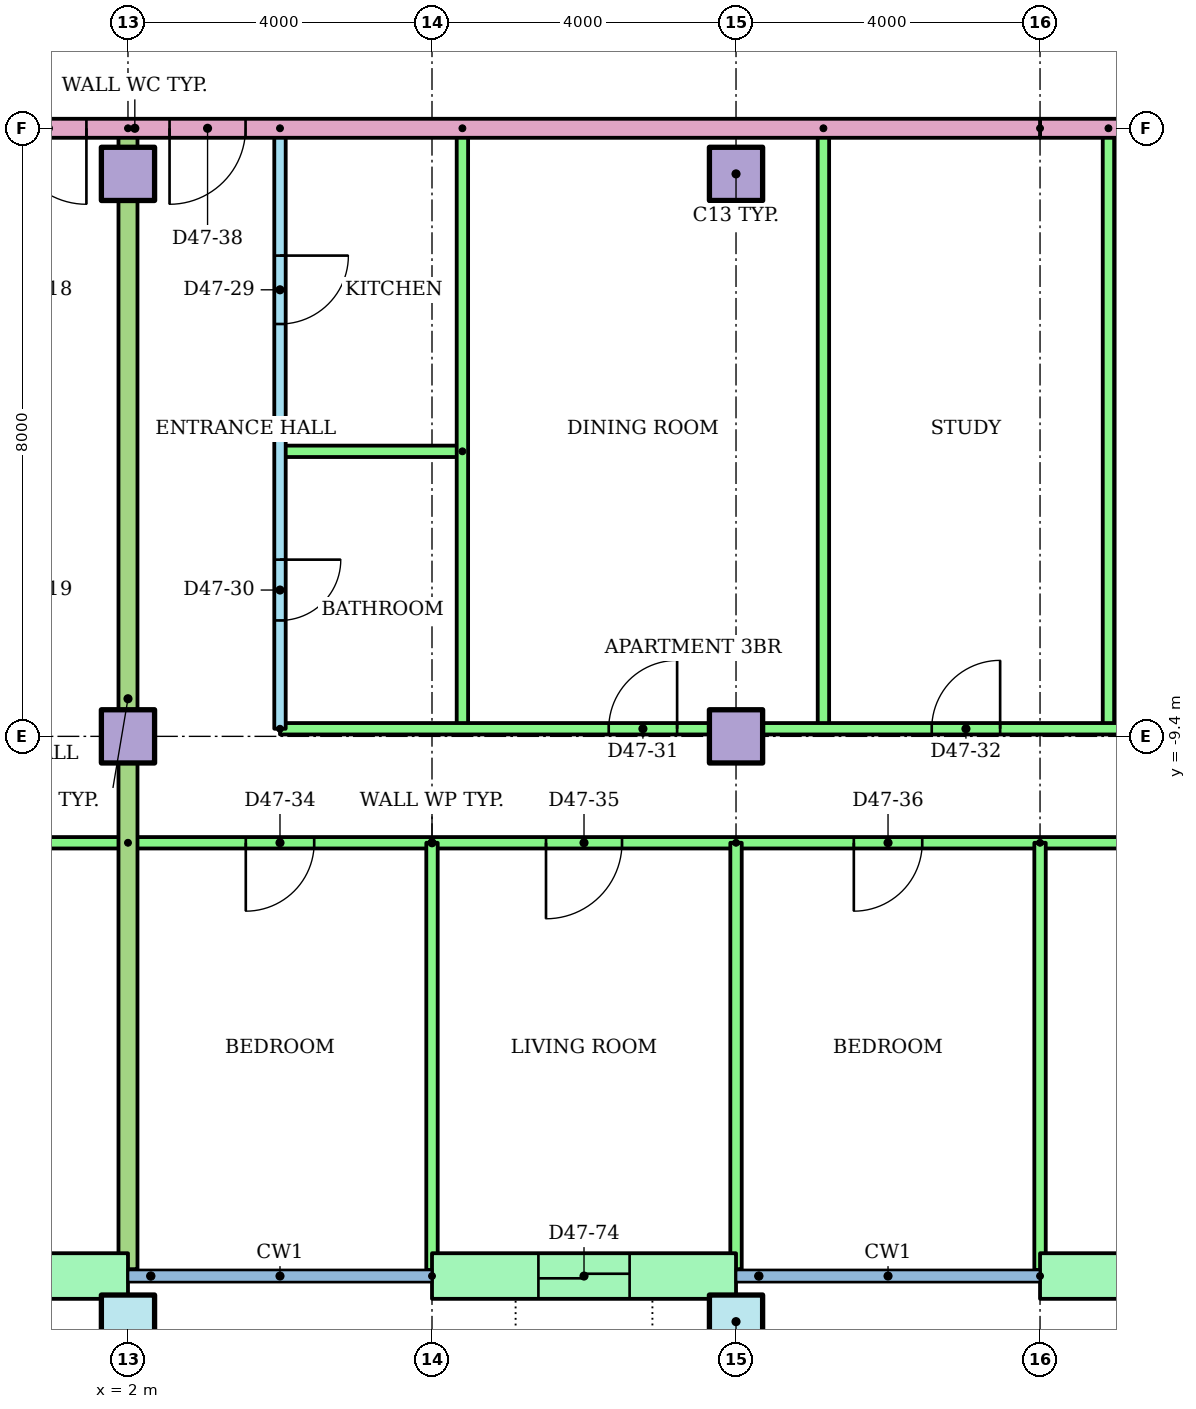
"""IFC4 building model, lengths in metres.
Left out: names, types, materials, properties, quantities, classifications, styles, units other than length and angle.
Written with IfcOpenShell. Run it as: python <this file> out.ifc"""

import sys

from ifc_helpers import new_model, si_unit, direction, frame, frame_2d, origin, origin_2d, place, context, subcontext, project, spatial, rectangle, hollow_rectangle, extrude, element, fill, save


model = new_model("IFC4")
c1 = context("Model", 3, precision=1e-05, world=origin(), true_north=direction((0.0, 1.0)))
c2 = subcontext(c1, "Body", "Model", "MODEL_VIEW")
j1 = project(units=[si_unit("LENGTHUNIT", "METRE"), si_unit("PLANEANGLEUNIT", "RADIAN")], contexts=[c1])
p1 = place(None, origin())
s1 = spatial("IfcSite", under=j1, at=p1, CompositionType="ELEMENT")
p2 = place(p1, origin())
s2 = spatial("IfcBuilding", under=s1, at=p2, CompositionType="ELEMENT")
p3 = place(p2, frame((0.0, 0.0, 181.3)))
s3 = spatial("IfcBuildingStorey", under=s2, at=p3, CompositionType="ELEMENT", Elevation=181.3)
for number, where in (
    (1, (2.0, -17.1, 0.0)),
    (2, (10.0, -17.1, 0.0)),
):
    element("IfcColumn", number, at=place(p3, frame(where)), inside=s3, PredefinedType="COLUMN", context=c2, shape_type="SweptSolid", body=[
        extrude(hollow_rectangle(XDim=0.7, YDim=0.7, WallThickness=0.036, at=origin_2d()), origin(), (0.0, 0.0, 1.0), 3.2),
    ])
for number, where in (
    (3, (2.0, -9.4, 0.0)),
    (4, (10.0, -9.4, 0.0)),
    (5, (2.0, -2.0, 0.0)),
    (6, (10.0, -2.0, 0.0)),
):
    element("IfcColumn", number, at=place(p3, frame(where)), inside=s3, PredefinedType="COLUMN", context=c2, shape_type="SweptSolid", body=[
        extrude(rectangle(XDim=0.7, YDim=0.7, at=origin_2d()), origin(), (0.0, 0.0, 1.0), 3.2),
    ])
p4 = place(p3, frame((-2.0, -16.5, 0.0)))
e7 = element("IfcWall", 7, at=p4, inside=s3, PredefinedType="STANDARD", context=c2, shape_type="SweptSolid", body=[
    extrude(rectangle(XDim=4.0, YDim=0.6, at=frame_2d((2.0, 0.0))), origin(), (0.0, 0.0, 1.0), 2.92),
])
p5 = place(p4, frame((1.4, 0.0, 0.0)))
e8 = element("IfcOpeningElement", 8, at=p5, cuts=e7, PredefinedType="OPENING", context=c2, shape_type="SweptSolid", body=[
    extrude(rectangle(XDim=1.2, YDim=2.1, at=frame_2d((0.6, 1.05))), frame((0.0, 0.31, 0.0), z_axis=(0.0, -1.0, 0.0), x_axis=(1.0, 0.0, 0.0)), (0.0, 0.0, 1.0), 0.62),
])
p6 = place(p3, frame((6.0, -16.5, 0.0)))
e9 = element("IfcWall", 9, at=p6, inside=s3, PredefinedType="STANDARD", context=c2, shape_type="SweptSolid", body=[
    extrude(rectangle(XDim=4.0, YDim=0.6, at=frame_2d((2.0, 0.0))), origin(), (0.0, 0.0, 1.0), 2.92),
])
p7 = place(p6, frame((1.4, 0.0, 0.0)))
e10 = element("IfcOpeningElement", 10, at=p7, cuts=e9, PredefinedType="OPENING", context=c2, shape_type="SweptSolid", body=[
    extrude(rectangle(XDim=1.2, YDim=2.1, at=frame_2d((0.6, 1.05))), frame((0.0, 0.31, 0.0), z_axis=(0.0, -1.0, 0.0), x_axis=(1.0, 0.0, 0.0)), (0.0, 0.0, 1.0), 0.62),
])
p8 = place(p3, frame((14.0, -16.5, 0.0)))
e11 = element("IfcWall", 11, at=p8, inside=s3, PredefinedType="STANDARD", context=c2, shape_type="SweptSolid", body=[
    extrude(rectangle(XDim=4.0, YDim=0.6, at=frame_2d((2.0, 0.0))), origin(), (0.0, 0.0, 1.0), 2.92),
])
p9 = place(p8, frame((1.4, 0.0, 0.0)))
e12 = element("IfcOpeningElement", 12, at=p9, cuts=e11, PredefinedType="OPENING", context=c2, shape_type="SweptSolid", body=[
    extrude(rectangle(XDim=1.2, YDim=2.1, at=frame_2d((0.6, 1.05))), frame((0.0, 0.31, 0.0), z_axis=(0.0, -1.0, 0.0), x_axis=(1.0, 0.0, 0.0)), (0.0, 0.0, 1.0), 0.62),
])
p10 = place(p3, frame((2.0, -10.8, 0.0), z_axis=(0.0, 0.0, 1.0), x_axis=(-1.0, 0.0, 0.0)))
e13 = element("IfcWall", 13, at=p10, inside=s3, PredefinedType="PARTITIONING", context=c2, shape_type="SweptSolid", body=[
    extrude(rectangle(XDim=26.82, YDim=0.15, at=frame_2d((13.41, 0.0))), origin(), (0.0, 0.0, 1.0), 2.4),
])
p11 = place(p10, frame((24.547, 0.0, 0.0)))
e14 = element("IfcOpeningElement", 14, at=p11, cuts=e13, PredefinedType="OPENING", context=c2, shape_type="SweptSolid", body=[
    extrude(rectangle(XDim=0.9, YDim=2.1, at=frame_2d((0.45, 1.05))), frame((0.0, 0.085, 0.0), z_axis=(0.0, -1.0, 0.0), x_axis=(1.0, 0.0, 0.0)), (0.0, 0.0, 1.0), 0.17),
])
p12 = place(p10, frame((18.6, 0.0, 0.0)))
e15 = element("IfcOpeningElement", 15, at=p12, cuts=e13, PredefinedType="OPENING", context=c2, shape_type="SweptSolid", body=[
    extrude(rectangle(XDim=0.9, YDim=2.1, at=frame_2d((0.45, 1.05))), frame((0.0, 0.085, 0.0), z_axis=(0.0, -1.0, 0.0), x_axis=(1.0, 0.0, 0.0)), (0.0, 0.0, 1.0), 0.17),
])
p13 = place(p10, frame((11.5, 0.0, 0.0)))
e16 = element("IfcOpeningElement", 16, at=p13, cuts=e13, PredefinedType="OPENING", context=c2, shape_type="SweptSolid", body=[
    extrude(rectangle(XDim=1.0, YDim=2.1, at=frame_2d((0.5, 1.05))), frame((0.0, 0.085, 0.0), z_axis=(0.0, -1.0, 0.0), x_axis=(1.0, 0.0, 0.0)), (0.0, 0.0, 1.0), 0.17),
])
p14 = place(p10, frame((5.55, 0.0, 0.0)))
e17 = element("IfcOpeningElement", 17, at=p14, cuts=e13, PredefinedType="OPENING", context=c2, shape_type="SweptSolid", body=[
    extrude(rectangle(XDim=0.9, YDim=2.1, at=frame_2d((0.45, 1.05))), frame((0.0, 0.085, 0.0), z_axis=(0.0, -1.0, 0.0), x_axis=(1.0, 0.0, 0.0)), (0.0, 0.0, 1.0), 0.17),
])
p15 = place(p10, frame((1.55, 0.0, 0.0)))
e18 = element("IfcOpeningElement", 18, at=p15, cuts=e13, PredefinedType="OPENING", context=c2, shape_type="SweptSolid", body=[
    extrude(rectangle(XDim=0.9, YDim=2.1, at=frame_2d((0.45, 1.05))), frame((0.0, 0.085, 0.0), z_axis=(0.0, -1.0, 0.0), x_axis=(1.0, 0.0, 0.0)), (0.0, 0.0, 1.0), 0.17),
])
p16 = place(p3, frame((4.0, -1.4, 0.0), z_axis=(0.0, 0.0, 1.0), x_axis=(0.0, -1.0, 0.0)))
e19 = element("IfcWall", 19, at=p16, inside=s3, PredefinedType="PARTITIONING", context=c2, shape_type="SweptSolid", body=[
    extrude(rectangle(XDim=7.9, YDim=0.15, at=frame_2d((3.95, 0.0))), origin(), (0.0, 0.0, 1.0), 2.4),
])
p17 = place(p16, frame((1.675, 0.0, 0.0)))
e20 = element("IfcOpeningElement", 20, at=p17, cuts=e19, PredefinedType="OPENING", context=c2, shape_type="SweptSolid", body=[
    extrude(rectangle(XDim=0.9, YDim=2.1, at=frame_2d((0.45, 1.05))), frame((0.0, 0.085, 0.0), z_axis=(0.0, -1.0, 0.0), x_axis=(1.0, 0.0, 0.0)), (0.0, 0.0, 1.0), 0.17),
])
p18 = place(p16, frame((5.675, 0.0, 0.0)))
e21 = element("IfcOpeningElement", 21, at=p18, cuts=e19, PredefinedType="OPENING", context=c2, shape_type="SweptSolid", body=[
    extrude(rectangle(XDim=0.8, YDim=2.1, at=frame_2d((0.4, 1.05))), frame((0.0, 0.085, 0.0), z_axis=(0.0, -1.0, 0.0), x_axis=(1.0, 0.0, 0.0)), (0.0, 0.0, 1.0), 0.17),
])
p19 = place(p3, frame((6.4, -5.65, 0.0), z_axis=(0.0, 0.0, 1.0), x_axis=(-1.0, 0.0, 0.0)))
e22 = element("IfcWall", 22, at=p19, inside=s3, PredefinedType="PARTITIONING", context=c2, shape_type="SweptSolid", body=[
    extrude(rectangle(XDim=2.4, YDim=0.15, at=frame_2d((1.2, 0.0))), origin(), (0.0, 0.0, 1.0), 2.4),
])
for number, where, z_axis, x_axis in (
    (23, (6.4, -1.4, 0.0), (0.0, 0.0, 1.0), (0.0, -1.0, 0.0)),
    (24, (11.15, -1.4, 0.0), (0.0, 0.0, 1.0), (0.0, -1.0, 0.0)),
    (25, (14.9, -1.4, 0.0), (0.0, 0.0, 1.0), (0.0, -1.0, 0.0)),
):
    element("IfcWall", number, at=place(p3, frame(where, z_axis=z_axis, x_axis=x_axis)), inside=s3, PredefinedType="PARTITIONING", context=c2, shape_type="SweptSolid", body=[
        extrude(rectangle(XDim=7.9, YDim=0.15, at=frame_2d((3.95, 0.0))), origin(), (0.0, 0.0, 1.0), 2.4),
    ])
p20 = place(p3, frame((4.0, -9.3, 0.0)))
e26 = element("IfcWall", 26, at=p20, inside=s3, PredefinedType="PARTITIONING", context=c2, shape_type="SweptSolid", body=[
    extrude(rectangle(XDim=14.0, YDim=0.15, at=frame_2d((7.0, 0.0))), origin(), (0.0, 0.0, 1.0), 2.4),
])
p21 = place(p20, frame((4.325, 0.0, 0.0)))
e27 = element("IfcOpeningElement", 27, at=p21, cuts=e26, PredefinedType="OPENING", context=c2, shape_type="SweptSolid", body=[
    extrude(rectangle(XDim=0.9, YDim=2.1, at=frame_2d((0.45, 1.05))), frame((0.0, 0.085, 0.0), z_axis=(0.0, -1.0, 0.0), x_axis=(1.0, 0.0, 0.0)), (0.0, 0.0, 1.0), 0.17),
])
p22 = place(p20, frame((8.575, 0.0, 0.0)))
e28 = element("IfcOpeningElement", 28, at=p22, cuts=e26, PredefinedType="OPENING", context=c2, shape_type="SweptSolid", body=[
    extrude(rectangle(XDim=0.9, YDim=2.1, at=frame_2d((0.45, 1.05))), frame((0.0, 0.085, 0.0), z_axis=(0.0, -1.0, 0.0), x_axis=(1.0, 0.0, 0.0)), (0.0, 0.0, 1.0), 0.17),
])
p23 = place(p20, frame((12.0, 0.0, 0.0)))
e29 = element("IfcOpeningElement", 29, at=p23, cuts=e26, PredefinedType="OPENING", context=c2, shape_type="SweptSolid", body=[
    extrude(rectangle(XDim=0.9, YDim=2.1, at=frame_2d((0.45, 1.05))), frame((0.0, 0.085, 0.0), z_axis=(0.0, -1.0, 0.0), x_axis=(1.0, 0.0, 0.0)), (0.0, 0.0, 1.0), 0.17),
])
p24 = place(p3, frame((18.0, -10.8, 0.0), z_axis=(0.0, 0.0, 1.0), x_axis=(-1.0, 0.0, 0.0)))
e30 = element("IfcWall", 30, at=p24, inside=s3, PredefinedType="PARTITIONING", context=c2, shape_type="SweptSolid", body=[
    extrude(rectangle(XDim=16.0, YDim=0.15, at=frame_2d((8.0, 0.0))), origin(), (0.0, 0.0, 1.0), 2.4),
])
p25 = place(p24, frame((13.55, 0.0, 0.0)))
e31 = element("IfcOpeningElement", 31, at=p25, cuts=e30, PredefinedType="OPENING", context=c2, shape_type="SweptSolid", body=[
    extrude(rectangle(XDim=0.9, YDim=2.1, at=frame_2d((0.45, 1.05))), frame((0.0, 0.085, 0.0), z_axis=(0.0, -1.0, 0.0), x_axis=(1.0, 0.0, 0.0)), (0.0, 0.0, 1.0), 0.17),
])
p26 = place(p24, frame((9.5, 0.0, 0.0)))
e32 = element("IfcOpeningElement", 32, at=p26, cuts=e30, PredefinedType="OPENING", context=c2, shape_type="SweptSolid", body=[
    extrude(rectangle(XDim=1.0, YDim=2.1, at=frame_2d((0.5, 1.05))), frame((0.0, 0.085, 0.0), z_axis=(0.0, -1.0, 0.0), x_axis=(1.0, 0.0, 0.0)), (0.0, 0.0, 1.0), 0.17),
])
p27 = place(p24, frame((5.55, 0.0, 0.0)))
e33 = element("IfcOpeningElement", 33, at=p27, cuts=e30, PredefinedType="OPENING", context=c2, shape_type="SweptSolid", body=[
    extrude(rectangle(XDim=0.9, YDim=2.1, at=frame_2d((0.45, 1.05))), frame((0.0, 0.085, 0.0), z_axis=(0.0, -1.0, 0.0), x_axis=(1.0, 0.0, 0.0)), (0.0, 0.0, 1.0), 0.17),
])
p28 = place(p24, frame((1.55, 0.0, 0.0)))
e34 = element("IfcOpeningElement", 34, at=p28, cuts=e30, PredefinedType="OPENING", context=c2, shape_type="SweptSolid", body=[
    extrude(rectangle(XDim=0.9, YDim=2.1, at=frame_2d((0.45, 1.05))), frame((0.0, 0.085, 0.0), z_axis=(0.0, -1.0, 0.0), x_axis=(1.0, 0.0, 0.0)), (0.0, 0.0, 1.0), 0.17),
])
p29 = place(p3, frame((6.0, -10.8, 0.0), z_axis=(0.0, 0.0, 1.0), x_axis=(0.0, -1.0, 0.0)))
e35 = element("IfcWall", 35, at=p29, inside=s3, PredefinedType="PARTITIONING", context=c2, shape_type="SweptSolid", body=[
    extrude(rectangle(XDim=5.621, YDim=0.15, at=frame_2d((2.811, 0.0))), origin(), (0.0, 0.0, 1.0), 2.4),
])
p30 = place(p3, frame((10.0, -10.8, 0.0), z_axis=(0.0, 0.0, 1.0), x_axis=(0.0, -1.0, 0.0)))
e36 = element("IfcWall", 36, at=p30, inside=s3, PredefinedType="PARTITIONING", context=c2, shape_type="SweptSolid", body=[
    extrude(rectangle(XDim=5.61, YDim=0.15, at=frame_2d((2.805, 0.0))), origin(), (0.0, 0.0, 1.0), 2.4),
])
p31 = place(p3, frame((14.0, -10.8, 0.0), z_axis=(0.0, 0.0, 1.0), x_axis=(0.0, -1.0, 0.0)))
e37 = element("IfcWall", 37, at=p31, inside=s3, PredefinedType="PARTITIONING", context=c2, shape_type="SweptSolid", body=[
    extrude(rectangle(XDim=5.621, YDim=0.15, at=frame_2d((2.811, 0.0))), origin(), (0.0, 0.0, 1.0), 2.4),
])
p32 = place(p3, frame((2.0, -1.4, 0.0), z_axis=(0.0, 0.0, 1.0), x_axis=(0.0, -1.0, 0.0)))
e38 = element("IfcWall", 38, at=p32, inside=s3, PredefinedType="PARTITIONING", context=c2, shape_type="SweptSolid", body=[
    extrude(rectangle(XDim=15.01, YDim=0.25, at=frame_2d((7.505, 0.0))), origin(), (0.0, 0.0, 1.0), 2.4),
])
p33 = place(p3, frame((29.0, -1.4, 0.0), z_axis=(0.0, 0.0, 1.0), x_axis=(-1.0, 0.0, 0.0)))
e39 = element("IfcWall", 39, at=p33, inside=s3, PredefinedType="PARTITIONING", context=c2, shape_type="SweptSolid", body=[
    extrude(rectangle(XDim=15.0, YDim=0.25, at=frame_2d((7.5, 0.0))), origin(), (0.0, 0.0, 1.0), 2.4),
])
p34 = place(p33, frame((9.453, 0.0, 0.0)))
e40 = element("IfcOpeningElement", 40, at=p34, cuts=e39, PredefinedType="OPENING", context=c2, shape_type="SweptSolid", body=[
    extrude(rectangle(XDim=1.0, YDim=2.1, at=frame_2d((0.5, 1.05))), frame((0.0, 0.135, 0.0), z_axis=(0.0, -1.0, 0.0), x_axis=(1.0, 0.0, 0.0)), (0.0, 0.0, 1.0), 0.27),
])
p35 = place(p33, frame((1.453, 0.0, 0.0)))
e41 = element("IfcOpeningElement", 41, at=p35, cuts=e39, PredefinedType="OPENING", context=c2, shape_type="SweptSolid", body=[
    extrude(rectangle(XDim=1.0, YDim=2.1, at=frame_2d((0.5, 1.05))), frame((0.0, 0.135, 0.0), z_axis=(0.0, -1.0, 0.0), x_axis=(1.0, 0.0, 0.0)), (0.0, 0.0, 1.0), 0.27),
])
p36 = place(p3, frame((14.0, -1.4, 0.0), z_axis=(0.0, 0.0, 1.0), x_axis=(-1.0, 0.0, 0.0)))
e42 = element("IfcWall", 42, at=p36, inside=s3, PredefinedType="PARTITIONING", context=c2, shape_type="SweptSolid", body=[
    extrude(rectangle(XDim=28.0, YDim=0.25, at=frame_2d((14.0, 0.0))), origin(), (0.0, 0.0, 1.0), 2.4),
])
p37 = place(p36, frame((12.547, 0.0, 0.0)))
e43 = element("IfcOpeningElement", 43, at=p37, cuts=e42, PredefinedType="OPENING", context=c2, shape_type="SweptSolid", body=[
    extrude(rectangle(XDim=1.0, YDim=2.1, at=frame_2d((0.5, 1.05))), frame((0.0, 0.135, 0.0), z_axis=(0.0, -1.0, 0.0), x_axis=(1.0, 0.0, 0.0)), (0.0, 0.0, 1.0), 0.27),
])
p38 = place(p36, frame((10.453, 0.0, 0.0)))
e44 = element("IfcOpeningElement", 44, at=p38, cuts=e42, PredefinedType="OPENING", context=c2, shape_type="SweptSolid", body=[
    extrude(rectangle(XDim=1.0, YDim=2.1, at=frame_2d((0.5, 1.05))), frame((0.0, 0.135, 0.0), z_axis=(0.0, -1.0, 0.0), x_axis=(1.0, 0.0, 0.0)), (0.0, 0.0, 1.0), 0.27),
])
p39 = place(p37, origin())
e45 = element("IfcDoor", 45, at=p39, inside=s3, OperationType="SINGLE_SWING_LEFT", PredefinedType="DOOR", context=c2, shape_type="SweptSolid", body=[
    extrude(rectangle(XDim=1.0, YDim=2.1, at=frame_2d((0.5, 1.05))), frame((0.0, 0.025, 0.0), z_axis=(0.0, -1.0, 0.0), x_axis=(1.0, 0.0, 0.0)), (0.0, 0.0, 1.0), 0.05),
])
fill(e43, e45)
p40 = place(p17, origin())
e46 = element("IfcDoor", 46, at=p40, inside=s3, OperationType="SINGLE_SWING_LEFT", PredefinedType="DOOR", context=c2, shape_type="SweptSolid", body=[
    extrude(rectangle(XDim=0.9, YDim=2.1, at=frame_2d((0.45, 1.05))), frame((0.0, 0.025, 0.0), z_axis=(0.0, -1.0, 0.0), x_axis=(1.0, 0.0, 0.0)), (0.0, 0.0, 1.0), 0.05),
])
fill(e20, e46)
p41 = place(p18, origin())
e47 = element("IfcDoor", 47, at=p41, inside=s3, OperationType="SINGLE_SWING_LEFT", PredefinedType="DOOR", context=c2, shape_type="SweptSolid", body=[
    extrude(rectangle(XDim=0.8, YDim=2.1, at=frame_2d((0.4, 1.05))), frame((0.0, 0.025, 0.0), z_axis=(0.0, -1.0, 0.0), x_axis=(1.0, 0.0, 0.0)), (0.0, 0.0, 1.0), 0.05),
])
fill(e21, e47)
p42 = place(p21, origin())
e48 = element("IfcDoor", 48, at=p42, inside=s3, OperationType="SINGLE_SWING_RIGHT", PredefinedType="DOOR", context=c2, shape_type="SweptSolid", body=[
    extrude(rectangle(XDim=0.9, YDim=2.1, at=frame_2d((0.45, 1.05))), frame((0.0, 0.025, 0.0), z_axis=(0.0, -1.0, 0.0), x_axis=(1.0, 0.0, 0.0)), (0.0, 0.0, 1.0), 0.05),
])
fill(e27, e48)
p43 = place(p22, origin())
e49 = element("IfcDoor", 49, at=p43, inside=s3, OperationType="SINGLE_SWING_RIGHT", PredefinedType="DOOR", context=c2, shape_type="SweptSolid", body=[
    extrude(rectangle(XDim=0.9, YDim=2.1, at=frame_2d((0.45, 1.05))), frame((0.0, 0.025, 0.0), z_axis=(0.0, -1.0, 0.0), x_axis=(1.0, 0.0, 0.0)), (0.0, 0.0, 1.0), 0.05),
])
fill(e28, e49)
p44 = place(p25, origin())
e50 = element("IfcDoor", 50, at=p44, inside=s3, OperationType="SINGLE_SWING_RIGHT", PredefinedType="DOOR", context=c2, shape_type="SweptSolid", body=[
    extrude(rectangle(XDim=0.9, YDim=2.1, at=frame_2d((0.45, 1.05))), frame((0.0, 0.025, 0.0), z_axis=(0.0, -1.0, 0.0), x_axis=(1.0, 0.0, 0.0)), (0.0, 0.0, 1.0), 0.05),
])
fill(e31, e50)
p45 = place(p26, origin())
e51 = element("IfcDoor", 51, at=p45, inside=s3, OperationType="SINGLE_SWING_RIGHT", PredefinedType="DOOR", context=c2, shape_type="SweptSolid", body=[
    extrude(rectangle(XDim=1.0, YDim=2.1, at=frame_2d((0.5, 1.05))), frame((0.0, 0.025, 0.0), z_axis=(0.0, -1.0, 0.0), x_axis=(1.0, 0.0, 0.0)), (0.0, 0.0, 1.0), 0.05),
])
fill(e32, e51)
p46 = place(p27, origin())
e52 = element("IfcDoor", 52, at=p46, inside=s3, OperationType="SINGLE_SWING_RIGHT", PredefinedType="DOOR", context=c2, shape_type="SweptSolid", body=[
    extrude(rectangle(XDim=0.9, YDim=2.1, at=frame_2d((0.45, 1.05))), frame((0.0, 0.025, 0.0), z_axis=(0.0, -1.0, 0.0), x_axis=(1.0, 0.0, 0.0)), (0.0, 0.0, 1.0), 0.05),
])
fill(e33, e52)
p47 = place(p38, origin())
e53 = element("IfcDoor", 53, at=p47, inside=s3, OperationType="SINGLE_SWING_RIGHT", PredefinedType="DOOR", context=c2, shape_type="SweptSolid", body=[
    extrude(rectangle(XDim=1.0, YDim=2.1, at=frame_2d((0.5, 1.05))), frame((0.0, 0.025, 0.0), z_axis=(0.0, -1.0, 0.0), x_axis=(1.0, 0.0, 0.0)), (0.0, 0.0, 1.0), 0.05),
])
fill(e44, e53)
p48 = place(p7, origin())
e54 = element("IfcDoor", 54, at=p48, inside=s3, OperationType="SLIDING_TO_LEFT", PredefinedType="DOOR", context=c2, shape_type="SweptSolid", body=[
    extrude(rectangle(XDim=1.2, YDim=2.1, at=frame_2d((0.6, 1.05))), frame((0.0, 0.025, 0.0), z_axis=(0.0, -1.0, 0.0), x_axis=(1.0, 0.0, 0.0)), (0.0, 0.0, 1.0), 0.05),
])
fill(e10, e54)
save(model, sys.argv[1])
